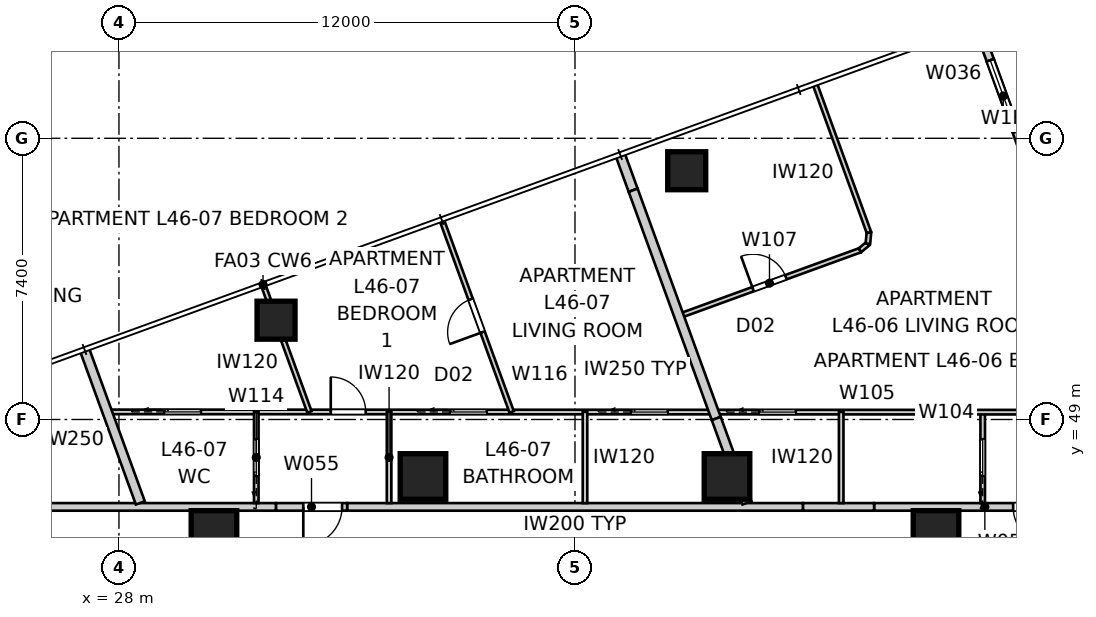
"""IFC4 building model, lengths in metres.
Left out: names, types, materials, properties, quantities, classifications, styles, units other than length and angle.
Written with IfcOpenShell. Run it as: python <this file> out.ifc"""

import sys

from ifc_helpers import new_model, si_unit, direction, frame, frame_2d, origin, origin_2d, place, context, subcontext, project, spatial, rectangle, extrude, element, fill, save


model = new_model("IFC4")
c1 = context("Model", 3, precision=1e-05, world=origin(), true_north=direction((0.0, 1.0)))
c2 = subcontext(c1, "Body", "Model", "MODEL_VIEW")
j1 = project(units=[si_unit("LENGTHUNIT", "METRE"), si_unit("PLANEANGLEUNIT", "RADIAN")], contexts=[c1])
p1 = place(None, origin())
s1 = spatial("IfcSite", under=j1, at=p1, CompositionType="ELEMENT")
p2 = place(p1, origin())
s2 = spatial("IfcBuilding", under=s1, at=p2, CompositionType="ELEMENT")
p3 = place(p2, frame((0.0, 0.0, 167.6)))
s3 = spatial("IfcBuildingStorey", under=s2, at=p3, CompositionType="ELEMENT", Elevation=167.6)
for number, where, z_axis, x_axis in (
    (1, (42.94, 55.546, 0.0), (0.0, 0.0, 1.0), (1.0, 0.0, 0.0)),
    (2, (32.134, 51.613, 0.0), (0.0, 0.0, 1.0), (1.0, 0.0, 0.0)),
):
    element("IfcColumn", number, at=place(p3, frame(where, z_axis=z_axis, x_axis=x_axis)), inside=s3, PredefinedType="COLUMN", context=c2, shape_type="SweptSolid", body=[
        extrude(rectangle(XDim=1.0, YDim=1.0, at=origin_2d()), origin(), (0.0, 0.0, 1.0), 3.2),
    ])
for number, where, z_axis, x_axis in (
    (3, (49.5, 46.0, 0.0), (0.0, 0.0, 1.0), (1.0, 0.0, 0.0)),
    (4, (44.0, 47.5, 0.0), (0.0, 0.0, 1.0), (1.0, 0.0, 0.0)),
    (5, (36.0, 47.5, 0.0), (0.0, 0.0, 1.0), (1.0, 0.0, 0.0)),
    (6, (30.5, 46.0, 0.0), (0.0, 0.0, 1.0), (1.0, 0.0, 0.0)),
):
    element("IfcColumn", number, at=place(p3, frame(where, z_axis=z_axis, x_axis=x_axis)), inside=s3, PredefinedType="COLUMN", context=c2, shape_type="SweptSolid", body=[
        extrude(rectangle(XDim=1.2, YDim=1.2, at=origin_2d()), origin(), (0.0, 0.0, 1.0), 3.4),
    ])
p4 = place(p3, frame((51.953, 55.634, 0.0), z_axis=(0.0, 0.0, 1.0), x_axis=(-0.341965219194, 0.939712609717, 0.0)))
e7 = element("IfcWall", 7, at=p4, inside=s3, PredefinedType="SOLIDWALL", context=c2, shape_type="SweptSolid", body=[
    extrude(rectangle(XDim=3.0, YDim=0.2, at=frame_2d((1.5, 0.0))), origin(), (0.0, 0.0, 1.0), 2.588),
])
p5 = place(p4, frame((1.0, 0.0, 0.4)))
e8 = element("IfcOpeningElement", 8, at=p5, cuts=e7, PredefinedType="OPENING", context=c2, shape_type="SweptSolid", body=[
    extrude(rectangle(XDim=2.0, YDim=1.8, at=frame_2d((1.0, 0.9))), frame((0.0, 0.11, 0.0), z_axis=(0.0, -1.0, 0.0), x_axis=(1.0, 0.0, 0.0)), (0.0, 0.0, 1.0), 0.22),
])
p6 = place(p3, frame((50.927, 58.453, 0.0), z_axis=(0.0, 0.0, 1.0), x_axis=(-0.342037080957, 0.939686455819, 0.0)))
e9 = element("IfcWall", 9, at=p6, inside=s3, PredefinedType="SOLIDWALL", context=c2, shape_type="SweptSolid", body=[
    extrude(rectangle(XDim=1.0, YDim=0.2, at=frame_2d((0.5, 0.0))), origin(), (0.0, 0.0, 1.0), 3.2),
])
p7 = place(p3, frame((53.7, 46.7, 0.0), z_axis=(0.0, 0.0, 1.0), x_axis=(-1.0, 0.0, 0.0)))
e10 = element("IfcWall", 10, at=p7, inside=s3, PredefinedType="PARTITIONING", context=c2, shape_type="SweptSolid", body=[
    extrude(rectangle(XDim=5.83, YDim=0.2, at=frame_2d((2.915, 0.0))), origin(), (0.0, 0.0, 1.0), 3.2),
])
p8 = place(p7, frame((1.151, 0.0, 0.0)))
e11 = element("IfcOpeningElement", 11, at=p8, cuts=e10, PredefinedType="OPENING", context=c2, shape_type="SweptSolid", body=[
    extrude(rectangle(XDim=1.02, YDim=2.34, at=frame_2d((0.51, 1.17))), frame((0.0, 0.11, 0.0), z_axis=(0.0, -1.0, 0.0), x_axis=(1.0, 0.0, 0.0)), (0.0, 0.0, 1.0), 0.22),
])
p9 = place(p3, frame((47.87, 46.7, 0.0), z_axis=(0.0, 0.0, 1.0), x_axis=(-1.0, 0.0, 0.0)))
e12 = element("IfcWall", 12, at=p9, inside=s3, PredefinedType="PARTITIONING", context=c2, shape_type="SweptSolid", body=[
    extrude(rectangle(XDim=1.874, YDim=0.2, at=frame_2d((0.937, 0.0))), origin(), (0.0, 0.0, 1.0), 2.2),
])
p10 = place(p3, frame((45.997, 46.7, 0.0), z_axis=(0.0, 0.0, 1.0), x_axis=(-1.0, 0.0, 0.0)))
e13 = element("IfcWall", 13, at=p10, inside=s3, PredefinedType="PARTITIONING", context=c2, shape_type="SweptSolid", body=[
    extrude(rectangle(XDim=11.993, YDim=0.2, at=frame_2d((5.997, 0.0))), origin(), (0.0, 0.0, 1.0), 3.2),
])
p11 = place(p3, frame((34.003, 46.7, 0.0), z_axis=(0.0, 0.0, 1.0), x_axis=(-1.0, 0.0, 0.0)))
e14 = element("IfcWall", 14, at=p11, inside=s3, PredefinedType="PARTITIONING", context=c2, shape_type="SweptSolid", body=[
    extrude(rectangle(XDim=1.874, YDim=0.2, at=frame_2d((0.937, 0.0))), origin(), (0.0, 0.0, 1.0), 2.2),
])
p12 = place(p11, frame((0.133, 0.0, 0.0)))
e15 = element("IfcOpeningElement", 15, at=p12, cuts=e14, PredefinedType="OPENING", context=c2, shape_type="SweptSolid", body=[
    extrude(rectangle(XDim=1.02, YDim=2.1, at=frame_2d((0.51, 1.05))), frame((0.0, 0.11, 0.0), z_axis=(0.0, -1.0, 0.0), x_axis=(1.0, 0.0, 0.0)), (0.0, 0.0, 1.0), 0.22),
])
p13 = place(p3, frame((32.13, 46.7, 0.0), z_axis=(0.0, 0.0, 1.0), x_axis=(-1.0, 0.0, 0.0)))
e16 = element("IfcWall", 16, at=p13, inside=s3, PredefinedType="PARTITIONING", context=c2, shape_type="SweptSolid", body=[
    extrude(rectangle(XDim=6.63, YDim=0.2, at=frame_2d((3.315, 0.0))), origin(), (0.0, 0.0, 1.0), 3.2),
])
p14 = place(p3, frame((41.188, 55.973, 0.0), z_axis=(0.0, 0.0, 1.0), x_axis=(0.342037080957, -0.939686455819, 0.0)))
e17 = element("IfcWall", 17, at=p14, inside=s3, PredefinedType="PARTITIONING", context=c2, shape_type="SweptSolid", body=[
    extrude(rectangle(XDim=1.0, YDim=0.25, at=frame_2d((0.5, 0.0))), origin(), (0.0, 0.0, 1.0), 3.2),
])
p15 = place(p3, frame((41.531, 55.033, 0.0), z_axis=(0.0, 0.0, 1.0), x_axis=(0.341991425514, -0.939703072718, 0.0)))
e18 = element("IfcWall", 18, at=p15, inside=s3, PredefinedType="PARTITIONING", context=c2, shape_type="SweptSolid", body=[
    extrude(rectangle(XDim=6.393, YDim=0.25, at=frame_2d((3.196, 0.0))), origin(), (0.0, 0.0, 1.0), 2.588),
])
p16 = place(p3, frame((43.717, 49.026, 0.0), z_axis=(0.0, 0.0, 1.0), x_axis=(0.342049950026, -0.939681771499, 0.0)))
e19 = element("IfcWall", 19, at=p16, inside=s3, PredefinedType="PARTITIONING", context=c2, shape_type="SweptSolid", body=[
    extrude(rectangle(XDim=2.363, YDim=0.25, at=frame_2d((1.182, 0.0))), origin(), (0.0, 0.0, 1.0), 3.2),
])
p17 = place(p3, frame((27.093, 50.843, 0.0), z_axis=(0.0, 0.0, 1.0), x_axis=(0.3420213594, -0.93969217817, 0.0)))
e20 = element("IfcWall", 20, at=p17, inside=s3, PredefinedType="PARTITIONING", context=c2, shape_type="SweptSolid", body=[
    extrude(rectangle(XDim=4.296, YDim=0.25, at=frame_2d((2.148, 0.0))), origin(), (0.0, 0.0, 1.0), 3.2),
])
p18 = place(p3, frame((50.729, 46.8, 0.0), z_axis=(0.0, 0.0, 1.0), x_axis=(0.0, 1.0, 0.0)))
e21 = element("IfcWall", 21, at=p18, inside=s3, PredefinedType="PARTITIONING", context=c2, shape_type="SweptSolid", body=[
    extrude(rectangle(XDim=2.4, YDim=0.12, at=frame_2d((1.2, 0.0))), origin(), (0.0, 0.0, 1.0), 3.2),
])
p19 = place(p18, frame((0.72, 0.0, 0.0)))
e22 = element("IfcOpeningElement", 22, at=p19, cuts=e21, PredefinedType="OPENING", context=c2, shape_type="SweptSolid", body=[
    extrude(rectangle(XDim=0.96, YDim=2.1, at=frame_2d((0.48, 1.05))), frame((0.0, 0.07, 0.0), z_axis=(0.0, -1.0, 0.0), x_axis=(1.0, 0.0, 0.0)), (0.0, 0.0, 1.0), 0.14),
])
p20 = place(p3, frame((27.691, 49.2, 0.0), z_axis=(0.0, 0.0, 1.0), x_axis=(0.999999952285, -0.000308918217, 0.0)))
e23 = element("IfcWall", 23, at=p20, inside=s3, PredefinedType="PARTITIONING", context=c2, shape_type="SweptSolid", body=[
    extrude(rectangle(XDim=30.822, YDim=0.12, at=frame_2d((15.411, 0.0))), origin(), (0.0, 0.0, 1.0), 3.2),
])
p21 = place(p20, frame((5.882, 0.0, 0.0)))
e24 = element("IfcOpeningElement", 24, at=p21, cuts=e23, PredefinedType="OPENING", context=c2, shape_type="SweptSolid", body=[
    extrude(rectangle(XDim=0.92, YDim=2.34, at=frame_2d((0.46, 1.17))), frame((0.0, 0.07, 0.0), z_axis=(0.0, -1.0, 0.0), x_axis=(1.0, 0.0, 0.0)), (0.0, 0.0, 1.0), 0.14),
])
p22 = place(p20, frame((28.07, 0.0, 0.0)))
e25 = element("IfcOpeningElement", 25, at=p22, cuts=e23, PredefinedType="OPENING", context=c2, shape_type="SweptSolid", body=[
    extrude(rectangle(XDim=0.92, YDim=2.34, at=frame_2d((0.46, 1.17))), frame((0.0, 0.07, 0.0), z_axis=(0.0, -1.0, 0.0), x_axis=(1.0, 0.0, 0.0)), (0.0, 0.0, 1.0), 0.14),
])
p23 = place(p20, frame((24.388, 0.0, 0.0)))
e26 = element("IfcOpeningElement", 26, at=p23, cuts=e23, PredefinedType="OPENING", context=c2, shape_type="SweptSolid", body=[
    extrude(rectangle(XDim=0.92, YDim=2.34, at=frame_2d((0.46, 1.17))), frame((0.0, 0.07, 0.0), z_axis=(0.0, -1.0, 0.0), x_axis=(1.0, 0.0, 0.0)), (0.0, 0.0, 1.0), 0.14),
])
p24 = place(p20, frame((1.506, 0.0, 0.0)))
e27 = element("IfcOpeningElement", 27, at=p24, cuts=e23, PredefinedType="OPENING", context=c2, shape_type="SweptSolid", body=[
    extrude(rectangle(XDim=0.96, YDim=2.1, at=frame_2d((0.48, 1.05))), frame((0.0, 0.07, 0.0), z_axis=(0.0, -1.0, 0.0), x_axis=(1.0, 0.0, 0.0)), (0.0, 0.0, 1.0), 0.14),
])
p25 = place(p20, frame((17.158, 0.0, 0.0)))
e28 = element("IfcOpeningElement", 28, at=p25, cuts=e23, PredefinedType="OPENING", context=c2, shape_type="SweptSolid", body=[
    extrude(rectangle(XDim=0.96, YDim=2.1, at=frame_2d((0.48, 1.05))), frame((0.0, 0.07, 0.0), z_axis=(0.0, -1.0, 0.0), x_axis=(1.0, 0.0, 0.0)), (0.0, 0.0, 1.0), 0.14),
])
p26 = place(p20, frame((9.026, 0.0, 0.0)))
e29 = element("IfcOpeningElement", 29, at=p26, cuts=e23, PredefinedType="OPENING", context=c2, shape_type="SweptSolid", body=[
    extrude(rectangle(XDim=0.96, YDim=2.1, at=frame_2d((0.48, 1.05))), frame((0.0, 0.07, 0.0), z_axis=(0.0, -1.0, 0.0), x_axis=(1.0, 0.0, 0.0)), (0.0, 0.0, 1.0), 0.14),
])
p27 = place(p20, frame((13.788, 0.0, 0.0)))
e30 = element("IfcOpeningElement", 30, at=p27, cuts=e23, PredefinedType="OPENING", context=c2, shape_type="SweptSolid", body=[
    extrude(rectangle(XDim=0.96, YDim=2.1, at=frame_2d((0.48, 1.05))), frame((0.0, 0.07, 0.0), z_axis=(0.0, -1.0, 0.0), x_axis=(1.0, 0.0, 0.0)), (0.0, 0.0, 1.0), 0.14),
])
p28 = place(p3, frame((47.005, 46.8, 0.0), z_axis=(0.0, 0.0, 1.0), x_axis=(0.0, 1.0, 0.0)))
e31 = element("IfcWall", 31, at=p28, inside=s3, PredefinedType="PARTITIONING", context=c2, shape_type="SweptSolid", body=[
    extrude(rectangle(XDim=2.4, YDim=0.12, at=frame_2d((1.2, 0.0))), origin(), (0.0, 0.0, 1.0), 3.2),
])
p29 = place(p3, frame((42.736, 51.72, 0.0), z_axis=(0.0, 0.0, 1.0), x_axis=(0.939707596988, 0.341978993747, 0.0)))
e32 = element("IfcWall", 32, at=p29, inside=s3, PredefinedType="PARTITIONING", context=c2, shape_type="SweptSolid", body=[
    extrude(rectangle(XDim=5.068, YDim=0.12, at=frame_2d((2.534, 0.0))), origin(), (0.0, 0.0, 1.0), 3.2),
])
p30 = place(p29, frame((2.074, 0.0, 0.0)))
e33 = element("IfcOpeningElement", 33, at=p30, cuts=e32, PredefinedType="OPENING", context=c2, shape_type="SweptSolid", body=[
    extrude(rectangle(XDim=0.92, YDim=2.34, at=frame_2d((0.46, 1.17))), frame((0.0, 0.07, 0.0), z_axis=(0.0, -1.0, 0.0), x_axis=(1.0, 0.0, 0.0)), (0.0, 0.0, 1.0), 0.14),
])
p31 = place(p3, frame((47.499, 53.453, 0.0), z_axis=(0.0, 0.0, 1.0), x_axis=(0.769326440299, 0.638855874401, 0.0)))
e34 = element("IfcWall", 34, at=p31, inside=s3, PredefinedType="PARTITIONING", context=c2, shape_type="SweptSolid", body=[
    extrude(rectangle(XDim=0.271, YDim=0.12, at=frame_2d((0.136, 0.0))), origin(), (0.0, 0.0, 1.0), 3.2),
])
p32 = place(p3, frame((47.708, 53.627, 0.0), z_axis=(0.0, 0.0, 1.0), x_axis=(0.092395121176, 0.995722421955, 0.0)))
e35 = element("IfcWall", 35, at=p32, inside=s3, PredefinedType="PARTITIONING", context=c2, shape_type="SweptSolid", body=[
    extrude(rectangle(XDim=0.296, YDim=0.12, at=frame_2d((0.148, 0.0))), origin(), (0.0, 0.0, 1.0), 3.2),
])
p33 = place(p3, frame((47.735, 53.921, 0.0), z_axis=(0.0, 0.0, 1.0), x_axis=(-0.342004304159, 0.93969838562, 0.0)))
e36 = element("IfcWall", 36, at=p33, inside=s3, PredefinedType="PARTITIONING", context=c2, shape_type="SweptSolid", body=[
    extrude(rectangle(XDim=4.127, YDim=0.12, at=frame_2d((2.063, 0.0))), origin(), (0.0, 0.0, 1.0), 3.2),
])
p34 = place(p3, frame((35.108, 49.2, 0.0), z_axis=(0.0, 0.0, 1.0), x_axis=(0.0, -1.0, 0.0)))
e37 = element("IfcWall", 37, at=p34, inside=s3, PredefinedType="PARTITIONING", context=c2, shape_type="SweptSolid", body=[
    extrude(rectangle(XDim=2.4, YDim=0.12, at=frame_2d((1.2, 0.0))), origin(), (0.0, 0.0, 1.0), 3.2),
])
p35 = place(p3, frame((31.613, 46.8, 0.0), z_axis=(0.0, 0.0, 1.0), x_axis=(0.0, 1.0, 0.0)))
e38 = element("IfcWall", 38, at=p35, inside=s3, PredefinedType="PARTITIONING", context=c2, shape_type="SweptSolid", body=[
    extrude(rectangle(XDim=2.4, YDim=0.12, at=frame_2d((1.2, 0.0))), origin(), (0.0, 0.0, 1.0), 3.2),
])
p36 = place(p35, frame((0.72, 0.0, 0.0)))
e39 = element("IfcOpeningElement", 39, at=p36, cuts=e38, PredefinedType="OPENING", context=c2, shape_type="SweptSolid", body=[
    extrude(rectangle(XDim=0.96, YDim=2.1, at=frame_2d((0.48, 1.05))), frame((0.0, 0.07, 0.0), z_axis=(0.0, -1.0, 0.0), x_axis=(1.0, 0.0, 0.0)), (0.0, 0.0, 1.0), 0.14),
])
p37 = place(p3, frame((40.263, 49.2, 0.0), z_axis=(0.0, 0.0, 1.0), x_axis=(0.0, -1.0, 0.0)))
e40 = element("IfcWall", 40, at=p37, inside=s3, PredefinedType="PARTITIONING", context=c2, shape_type="SweptSolid", body=[
    extrude(rectangle(XDim=2.4, YDim=0.12, at=frame_2d((1.2, 0.0))), origin(), (0.0, 0.0, 1.0), 3.2),
])
p38 = place(p3, frame((38.333, 49.2, 0.0), z_axis=(0.0, 0.0, 1.0), x_axis=(-0.341995981916, 0.939701414468, 0.0)))
e41 = element("IfcWall", 41, at=p38, inside=s3, PredefinedType="PARTITIONING", context=c2, shape_type="SweptSolid", body=[
    extrude(rectangle(XDim=5.348, YDim=0.12, at=frame_2d((2.674, 0.0))), origin(), (0.0, 0.0, 1.0), 3.2),
])
p39 = place(p38, frame((2.234, 0.0, 0.0)))
e42 = element("IfcOpeningElement", 42, at=p39, cuts=e41, PredefinedType="OPENING", context=c2, shape_type="SweptSolid", body=[
    extrude(rectangle(XDim=0.92, YDim=2.34, at=frame_2d((0.46, 1.17))), frame((0.0, 0.07, 0.0), z_axis=(0.0, -1.0, 0.0), x_axis=(1.0, 0.0, 0.0)), (0.0, 0.0, 1.0), 0.14),
])
p40 = place(p3, frame((33.012, 49.2, 0.0), z_axis=(0.0, 0.0, 1.0), x_axis=(-0.341998645001, 0.939700445258, 0.0)))
e43 = element("IfcWall", 43, at=p40, inside=s3, PredefinedType="PARTITIONING", context=c2, shape_type="SweptSolid", body=[
    extrude(rectangle(XDim=3.528, YDim=0.12, at=frame_2d((1.764, 0.0))), origin(), (0.0, 0.0, 1.0), 3.2),
])
p41 = place(p5, origin())
e44 = element("IfcWindow", 44, at=p41, inside=s3, PartitioningType="SINGLE_PANEL", PredefinedType="WINDOW", context=c2, shape_type="SweptSolid", body=[
    extrude(rectangle(XDim=2.0, YDim=1.8, at=frame_2d((1.0, 0.9))), frame((0.0, 0.03, 0.0), z_axis=(0.0, -1.0, 0.0), x_axis=(1.0, 0.0, 0.0)), (0.0, 0.0, 1.0), 0.06),
])
fill(e8, e44)
p42 = place(p12, origin())
e45 = element("IfcDoor", 45, at=p42, inside=s3, OperationType="SINGLE_SWING_RIGHT", PredefinedType="DOOR", context=c2, shape_type="SweptSolid", body=[
    extrude(rectangle(XDim=1.02, YDim=2.1, at=frame_2d((0.51, 1.05))), frame((0.0, 0.025, 0.0), z_axis=(0.0, -1.0, 0.0), x_axis=(1.0, 0.0, 0.0)), (0.0, 0.0, 1.0), 0.05),
])
fill(e15, e45)
p43 = place(p8, origin())
e46 = element("IfcDoor", 46, at=p43, inside=s3, OperationType="SINGLE_SWING_LEFT", PredefinedType="DOOR", context=c2, shape_type="SweptSolid", body=[
    extrude(rectangle(XDim=1.02, YDim=2.34, at=frame_2d((0.51, 1.17))), frame((0.0, 0.025, 0.0), z_axis=(0.0, -1.0, 0.0), x_axis=(1.0, 0.0, 0.0)), (0.0, 0.0, 1.0), 0.05),
])
fill(e11, e46)
p44 = place(p36, origin())
e47 = element("IfcDoor", 47, at=p44, inside=s3, OperationType="SLIDING_TO_LEFT", PredefinedType="DOOR", context=c2, shape_type="SweptSolid", body=[
    extrude(rectangle(XDim=0.96, YDim=2.1, at=frame_2d((0.48, 1.05))), frame((0.0, 0.025, 0.0), z_axis=(0.0, -1.0, 0.0), x_axis=(1.0, 0.0, 0.0)), (0.0, 0.0, 1.0), 0.05),
])
fill(e39, e47)
p45 = place(p21, origin())
e48 = element("IfcDoor", 48, at=p45, inside=s3, OperationType="SINGLE_SWING_LEFT", PredefinedType="DOOR", context=c2, shape_type="SweptSolid", body=[
    extrude(rectangle(XDim=0.92, YDim=2.34, at=frame_2d((0.46, 1.17))), frame((0.0, 0.025, 0.0), z_axis=(0.0, -1.0, 0.0), x_axis=(1.0, 0.0, 0.0)), (0.0, 0.0, 1.0), 0.05),
])
fill(e24, e48)
p46 = place(p19, origin())
e49 = element("IfcDoor", 49, at=p46, inside=s3, OperationType="SLIDING_TO_LEFT", PredefinedType="DOOR", context=c2, shape_type="SweptSolid", body=[
    extrude(rectangle(XDim=0.96, YDim=2.1, at=frame_2d((0.48, 1.05))), frame((0.0, 0.025, 0.0), z_axis=(0.0, -1.0, 0.0), x_axis=(1.0, 0.0, 0.0)), (0.0, 0.0, 1.0), 0.05),
])
fill(e22, e49)
p47 = place(p24, origin())
e50 = element("IfcDoor", 50, at=p47, inside=s3, OperationType="SLIDING_TO_LEFT", PredefinedType="DOOR", context=c2, shape_type="SweptSolid", body=[
    extrude(rectangle(XDim=0.96, YDim=2.1, at=frame_2d((0.48, 1.05))), frame((0.0, 0.025, 0.0), z_axis=(0.0, -1.0, 0.0), x_axis=(1.0, 0.0, 0.0)), (0.0, 0.0, 1.0), 0.05),
])
fill(e27, e50)
p48 = place(p30, origin())
e51 = element("IfcDoor", 51, at=p48, inside=s3, OperationType="SINGLE_SWING_LEFT", PredefinedType="DOOR", context=c2, shape_type="SweptSolid", body=[
    extrude(rectangle(XDim=0.92, YDim=2.34, at=frame_2d((0.46, 1.17))), frame((0.0, 0.025, 0.0), z_axis=(0.0, -1.0, 0.0), x_axis=(1.0, 0.0, 0.0)), (0.0, 0.0, 1.0), 0.05),
])
fill(e33, e51)
p49 = place(p25, origin())
e52 = element("IfcDoor", 52, at=p49, inside=s3, OperationType="SLIDING_TO_LEFT", PredefinedType="DOOR", context=c2, shape_type="SweptSolid", body=[
    extrude(rectangle(XDim=0.96, YDim=2.1, at=frame_2d((0.48, 1.05))), frame((0.0, 0.025, 0.0), z_axis=(0.0, -1.0, 0.0), x_axis=(1.0, 0.0, 0.0)), (0.0, 0.0, 1.0), 0.05),
])
fill(e28, e52)
p50 = place(p39, origin())
e53 = element("IfcDoor", 53, at=p50, inside=s3, OperationType="SINGLE_SWING_LEFT", PredefinedType="DOOR", context=c2, shape_type="SweptSolid", body=[
    extrude(rectangle(XDim=0.92, YDim=2.34, at=frame_2d((0.46, 1.17))), frame((0.0, 0.025, 0.0), z_axis=(0.0, -1.0, 0.0), x_axis=(1.0, 0.0, 0.0)), (0.0, 0.0, 1.0), 0.05),
])
fill(e42, e53)
p51 = place(p26, origin())
e54 = element("IfcDoor", 54, at=p51, inside=s3, OperationType="SLIDING_TO_LEFT", PredefinedType="DOOR", context=c2, shape_type="SweptSolid", body=[
    extrude(rectangle(XDim=0.96, YDim=2.1, at=frame_2d((0.48, 1.05))), frame((0.0, 0.025, 0.0), z_axis=(0.0, -1.0, 0.0), x_axis=(1.0, 0.0, 0.0)), (0.0, 0.0, 1.0), 0.05),
])
fill(e29, e54)
p52 = place(p27, origin())
e55 = element("IfcDoor", 55, at=p52, inside=s3, OperationType="SLIDING_TO_LEFT", PredefinedType="DOOR", context=c2, shape_type="SweptSolid", body=[
    extrude(rectangle(XDim=0.96, YDim=2.1, at=frame_2d((0.48, 1.05))), frame((0.0, 0.025, 0.0), z_axis=(0.0, -1.0, 0.0), x_axis=(1.0, 0.0, 0.0)), (0.0, 0.0, 1.0), 0.05),
])
fill(e30, e55)
save(model, sys.argv[1])
